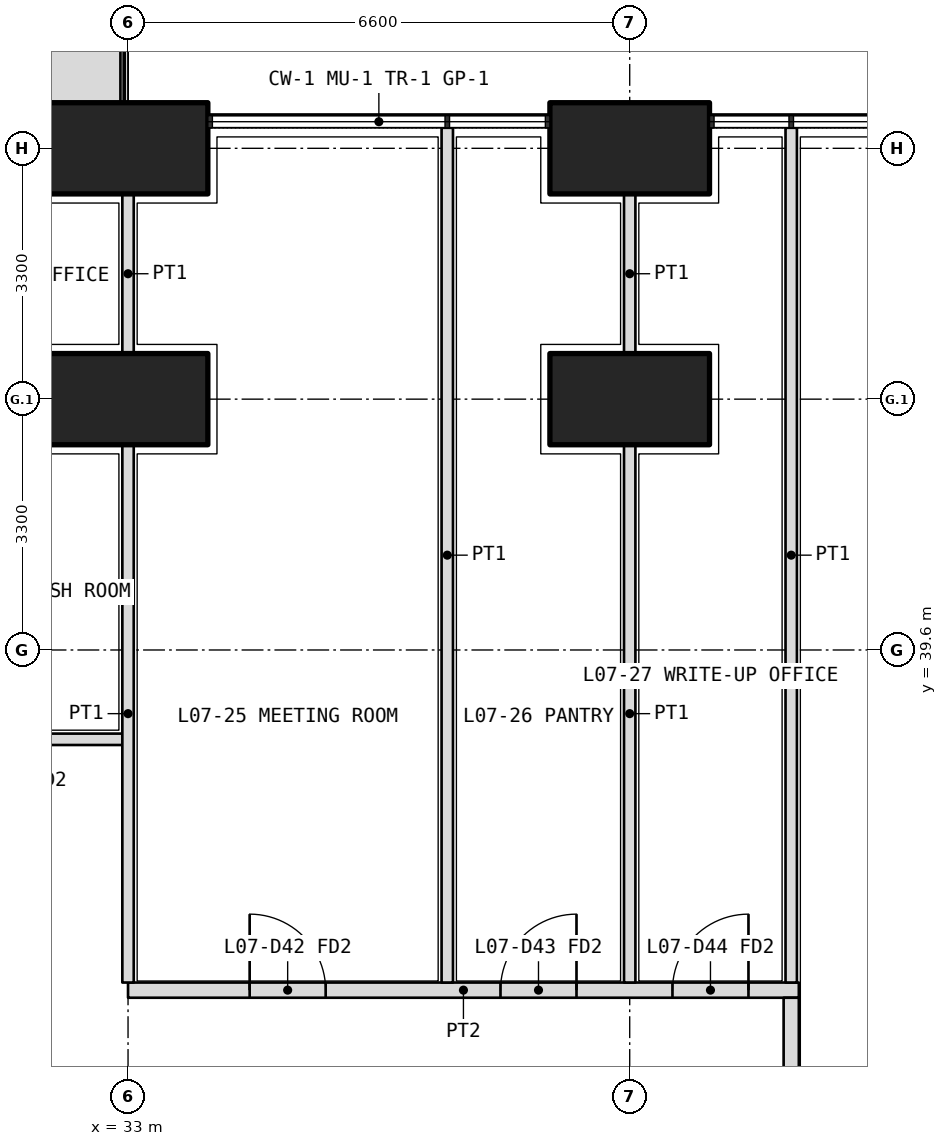
"""IFC4 building model, lengths in metres.
Left out: names, types, materials, properties, quantities, classifications, styles, units other than length and angle.
Written with IfcOpenShell. Run it as: python <this file> out.ifc"""

import sys

from ifc_helpers import new_model, si_unit, direction, frame, frame_2d, origin, origin_2d, place, context, subcontext, project, spatial, polyline, rectangle, outline, extrude, element, fill, save


model = new_model("IFC4")
c1 = context("Model", 3, precision=1e-05, world=origin(), true_north=direction((0.0, 1.0)))
c2 = subcontext(c1, "Body", "Model", "MODEL_VIEW")
j1 = project(units=[si_unit("LENGTHUNIT", "METRE"), si_unit("PLANEANGLEUNIT", "RADIAN")], contexts=[c1])
p1 = place(None, origin())
s1 = spatial("IfcSite", under=j1, at=p1, CompositionType="ELEMENT")
p2 = place(p1, origin())
s2 = spatial("IfcBuilding", under=s1, at=p2, CompositionType="ELEMENT")
p3 = place(p2, frame((0.0, 0.0, 33.9)))
s3 = spatial("IfcBuildingStorey", under=s2, at=p3, CompositionType="ELEMENT", Elevation=33.9)
for number, where, z_axis, x_axis in (
    (1, (33.0, 46.2, 0.0), (0.0, 0.0, 1.0), (1.0, 0.0, 0.0)),
    (2, (39.6, 46.2, 0.0), (0.0, 0.0, 1.0), (1.0, 0.0, 0.0)),
    (3, (33.0, 42.9, 0.0), (0.0, 0.0, 1.0), (1.0, 0.0, 0.0)),
    (4, (39.6, 42.9, 0.0), (0.0, 0.0, 1.0), (1.0, 0.0, 0.0)),
):
    element("IfcColumn", number, at=place(p3, frame(where, z_axis=z_axis, x_axis=x_axis)), inside=s3, PredefinedType="COLUMN", context=c2, shape_type="SweptSolid", body=[
        extrude(rectangle(XDim=2.1, YDim=1.2, at=origin_2d()), origin(), (0.0, 0.0, 1.0), 4.2),
    ])
p4 = place(p3, origin())
e5 = element("IfcWall", 5, at=p4, inside=s3, PredefinedType="USERDEFINED", context=c2, shape_type="SweptSolid", body=[
    extrude(outline(polyline([(23.85, 46.75), (32.9, 46.75), (32.9, 47.75), (23.85, 47.75), (23.85, 46.75)]), holes=[polyline([(24.0, 46.9), (32.75, 46.9), (32.75, 47.6), (24.0, 47.6), (24.0, 46.9)])]), origin(), (0.0, 0.0, 1.0), 1.05),
])
p5 = place(p3, frame((33.0, 35.125, 0.0), z_axis=(0.0, 0.0, 1.0), x_axis=(1.0, 0.0, 0.0)))
e6 = element("IfcWall", 6, at=p5, inside=s3, PredefinedType="PARTITIONING", context=c2, shape_type="SweptSolid", body=[
    extrude(rectangle(XDim=8.825, YDim=0.2, at=frame_2d((4.413, 0.0))), origin(), (0.0, 0.0, 1.0), 2.85),
])
p6 = place(p5, frame((1.6, 0.0, 0.0)))
e7 = element("IfcOpeningElement", 7, at=p6, cuts=e6, PredefinedType="OPENING", context=c2, shape_type="SweptSolid", body=[
    extrude(rectangle(XDim=1.0, YDim=2.1, at=frame_2d((0.5, 1.05))), frame((0.0, 0.11, 0.0), z_axis=(0.0, -1.0, 0.0), x_axis=(1.0, 0.0, 0.0)), (0.0, 0.0, 1.0), 0.22),
])
p7 = place(p5, frame((4.9, 0.0, 0.0)))
e8 = element("IfcOpeningElement", 8, at=p7, cuts=e6, PredefinedType="OPENING", context=c2, shape_type="SweptSolid", body=[
    extrude(rectangle(XDim=1.0, YDim=2.1, at=frame_2d((0.5, 1.05))), frame((0.0, 0.11, 0.0), z_axis=(0.0, -1.0, 0.0), x_axis=(1.0, 0.0, 0.0)), (0.0, 0.0, 1.0), 0.22),
])
p8 = place(p5, frame((7.163, 0.0, 0.0)))
e9 = element("IfcOpeningElement", 9, at=p8, cuts=e6, PredefinedType="OPENING", context=c2, shape_type="SweptSolid", body=[
    extrude(rectangle(XDim=1.0, YDim=2.1, at=frame_2d((0.5, 1.05))), frame((0.0, 0.11, 0.0), z_axis=(0.0, -1.0, 0.0), x_axis=(1.0, 0.0, 0.0)), (0.0, 0.0, 1.0), 0.22),
])
p9 = place(p3, frame((41.725, 11.175, 0.0), z_axis=(0.0, 0.0, 1.0), x_axis=(0.0, 1.0, 0.0)))
e10 = element("IfcWall", 10, at=p9, inside=s3, PredefinedType="PARTITIONING", context=c2, shape_type="SweptSolid", body=[
    extrude(rectangle(XDim=23.85, YDim=0.2, at=frame_2d((11.925, 0.0))), origin(), (0.0, 0.0, 1.0), 2.85),
])
p10 = place(p9, frame((2.113, 0.0, 0.0)))
e11 = element("IfcOpeningElement", 11, at=p10, cuts=e10, PredefinedType="OPENING", context=c2, shape_type="SweptSolid", body=[
    extrude(rectangle(XDim=1.0, YDim=2.1, at=frame_2d((0.5, 1.05))), frame((0.0, 0.11, 0.0), z_axis=(0.0, -1.0, 0.0), x_axis=(1.0, 0.0, 0.0)), (0.0, 0.0, 1.0), 0.22),
])
p11 = place(p9, frame((6.475, 0.0, 0.0)))
e12 = element("IfcOpeningElement", 12, at=p11, cuts=e10, PredefinedType="OPENING", context=c2, shape_type="SweptSolid", body=[
    extrude(rectangle(XDim=1.0, YDim=2.1, at=frame_2d((0.5, 1.05))), frame((0.0, 0.11, 0.0), z_axis=(0.0, -1.0, 0.0), x_axis=(1.0, 0.0, 0.0)), (0.0, 0.0, 1.0), 0.22),
])
p12 = place(p9, frame((9.725, 0.0, 0.0)))
e13 = element("IfcOpeningElement", 13, at=p12, cuts=e10, PredefinedType="OPENING", context=c2, shape_type="SweptSolid", body=[
    extrude(rectangle(XDim=1.0, YDim=2.1, at=frame_2d((0.5, 1.05))), frame((0.0, 0.11, 0.0), z_axis=(0.0, -1.0, 0.0), x_axis=(1.0, 0.0, 0.0)), (0.0, 0.0, 1.0), 0.22),
])
p13 = place(p9, frame((13.075, 0.0, 0.0)))
e14 = element("IfcOpeningElement", 14, at=p13, cuts=e10, PredefinedType="OPENING", context=c2, shape_type="SweptSolid", body=[
    extrude(rectangle(XDim=0.9, YDim=2.1, at=frame_2d((0.45, 1.05))), frame((0.0, 0.11, 0.0), z_axis=(0.0, -1.0, 0.0), x_axis=(1.0, 0.0, 0.0)), (0.0, 0.0, 1.0), 0.22),
])
p14 = place(p9, frame((19.087, 0.0, 0.0)))
e15 = element("IfcOpeningElement", 15, at=p14, cuts=e10, PredefinedType="OPENING", context=c2, shape_type="SweptSolid", body=[
    extrude(rectangle(XDim=1.0, YDim=2.1, at=frame_2d((0.5, 1.05))), frame((0.0, 0.11, 0.0), z_axis=(0.0, -1.0, 0.0), x_axis=(1.0, 0.0, 0.0)), (0.0, 0.0, 1.0), 0.22),
])
p15 = place(p3, frame((41.725, 46.47, 0.0), z_axis=(0.0, 0.0, 1.0), x_axis=(0.0, -1.0, 0.0)))
e16 = element("IfcWall", 16, at=p15, inside=s3, PredefinedType="PARTITIONING", context=c2, shape_type="SweptSolid", body=[
    extrude(rectangle(XDim=11.245, YDim=0.15, at=frame_2d((5.623, 0.0))), origin(), (0.0, 0.0, 1.0), 2.7),
])
p16 = place(p3, frame((29.7, 38.425, 0.0), z_axis=(0.0, 0.0, 1.0), x_axis=(1.0, 0.0, 0.0)))
e17 = element("IfcWall", 17, at=p16, inside=s3, PredefinedType="PARTITIONING", context=c2, shape_type="SweptSolid", body=[
    extrude(rectangle(XDim=3.3, YDim=0.15, at=frame_2d((1.65, 0.0))), origin(), (0.0, 0.0, 1.0), 2.85),
])
p17 = place(p16, frame((1.15, 0.0, 0.0)))
e18 = element("IfcOpeningElement", 18, at=p17, cuts=e17, PredefinedType="OPENING", context=c2, shape_type="SweptSolid", body=[
    extrude(rectangle(XDim=1.0, YDim=2.1, at=frame_2d((0.5, 1.05))), frame((0.0, 0.085, 0.0), z_axis=(0.0, -1.0, 0.0), x_axis=(1.0, 0.0, 0.0)), (0.0, 0.0, 1.0), 0.17),
])
p18 = place(p3, frame((37.2, 46.47, 0.0), z_axis=(0.0, 0.0, 1.0), x_axis=(0.0, -1.0, 0.0)))
e19 = element("IfcWall", 19, at=p18, inside=s3, PredefinedType="PARTITIONING", context=c2, shape_type="SweptSolid", body=[
    extrude(rectangle(XDim=11.245, YDim=0.15, at=frame_2d((5.623, 0.0))), origin(), (0.0, 0.0, 1.0), 2.7),
])
p19 = place(p3, frame((39.6, 45.6, 0.0), z_axis=(0.0, 0.0, 1.0), x_axis=(0.0, -1.0, 0.0)))
e20 = element("IfcWall", 20, at=p19, inside=s3, PredefinedType="PARTITIONING", context=c2, shape_type="SweptSolid", body=[
    extrude(rectangle(XDim=2.1, YDim=0.15, at=frame_2d((1.05, 0.0))), origin(), (0.0, 0.0, 1.0), 2.85),
])
p20 = place(p3, frame((39.6, 42.3, 0.0), z_axis=(0.0, 0.0, 1.0), x_axis=(0.0, -1.0, 0.0)))
e21 = element("IfcWall", 21, at=p20, inside=s3, PredefinedType="PARTITIONING", context=c2, shape_type="SweptSolid", body=[
    extrude(rectangle(XDim=7.075, YDim=0.15, at=frame_2d((3.538, 0.0))), origin(), (0.0, 0.0, 1.0), 2.85),
])
p21 = place(p3, frame((33.0, 45.6, 0.0), z_axis=(0.0, 0.0, 1.0), x_axis=(0.0, -1.0, 0.0)))
e22 = element("IfcWall", 22, at=p21, inside=s3, PredefinedType="PARTITIONING", context=c2, shape_type="SweptSolid", body=[
    extrude(rectangle(XDim=2.1, YDim=0.15, at=frame_2d((1.05, 0.0))), origin(), (0.0, 0.0, 1.0), 2.85),
])
p22 = place(p3, frame((33.0, 42.3, 0.0), z_axis=(0.0, 0.0, 1.0), x_axis=(0.0, -1.0, 0.0)))
e23 = element("IfcWall", 23, at=p22, inside=s3, PredefinedType="PARTITIONING", context=c2, shape_type="SweptSolid", body=[
    extrude(rectangle(XDim=7.075, YDim=0.15, at=frame_2d((3.538, 0.0))), origin(), (0.0, 0.0, 1.0), 2.85),
])
p23 = place(p6, origin())
e24 = element("IfcDoor", 24, at=p23, inside=s3, OperationType="SINGLE_SWING_LEFT", PredefinedType="DOOR", context=c2, shape_type="SweptSolid", body=[
    extrude(rectangle(XDim=1.0, YDim=2.1, at=frame_2d((0.5, 1.05))), frame((0.0, 0.025, 0.0), z_axis=(0.0, -1.0, 0.0), x_axis=(1.0, 0.0, 0.0)), (0.0, 0.0, 1.0), 0.05),
])
fill(e7, e24)
p24 = place(p7, origin())
e25 = element("IfcDoor", 25, at=p24, inside=s3, OperationType="SINGLE_SWING_RIGHT", PredefinedType="DOOR", context=c2, shape_type="SweptSolid", body=[
    extrude(rectangle(XDim=1.0, YDim=2.1, at=frame_2d((0.5, 1.05))), frame((0.0, 0.025, 0.0), z_axis=(0.0, -1.0, 0.0), x_axis=(1.0, 0.0, 0.0)), (0.0, 0.0, 1.0), 0.05),
])
fill(e8, e25)
p25 = place(p8, origin())
e26 = element("IfcDoor", 26, at=p25, inside=s3, OperationType="SINGLE_SWING_RIGHT", PredefinedType="DOOR", context=c2, shape_type="SweptSolid", body=[
    extrude(rectangle(XDim=1.0, YDim=2.1, at=frame_2d((0.5, 1.05))), frame((0.0, 0.025, 0.0), z_axis=(0.0, -1.0, 0.0), x_axis=(1.0, 0.0, 0.0)), (0.0, 0.0, 1.0), 0.05),
])
fill(e9, e26)
save(model, sys.argv[1])
